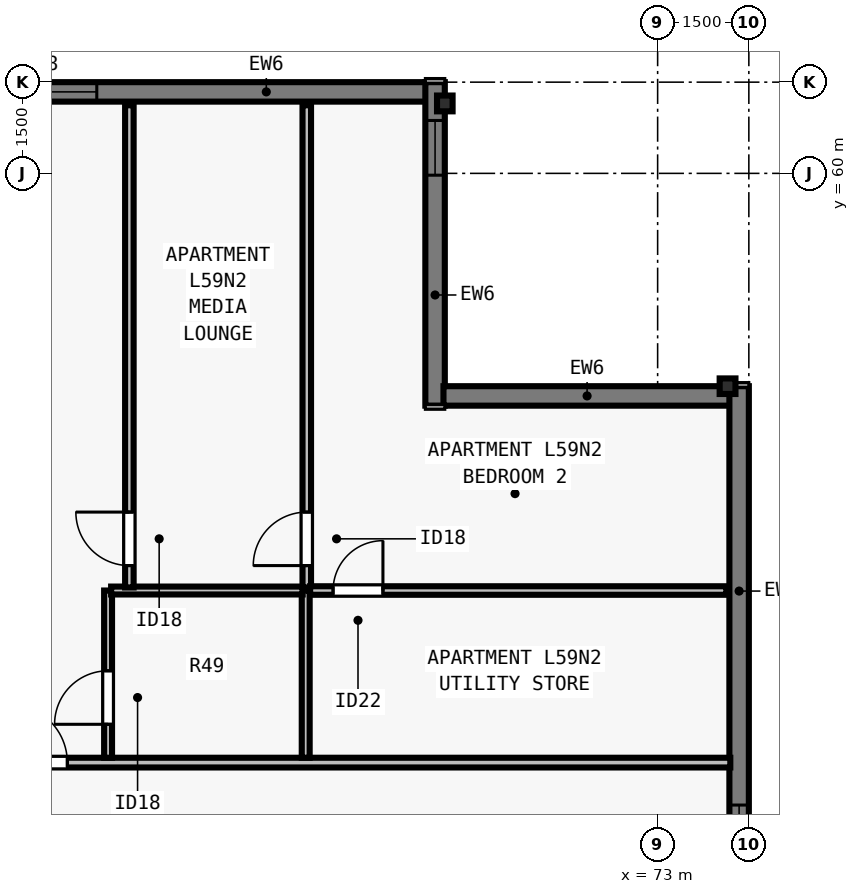
"""IFC4 building model, lengths in metres.
Left out: names, types, materials, properties, quantities, classifications, styles, units other than length and angle.
Written with IfcOpenShell. Run it as: python <this file> out.ifc"""

import sys

from ifc_helpers import new_model, si_unit, direction, frame, frame_2d, origin, origin_2d, place, context, subcontext, project, spatial, rectangle, i_section, extrude, element, fill, save


model = new_model("IFC4")
c1 = context("Model", 3, precision=1e-05, world=origin(), true_north=direction((0.0, 1.0)))
c2 = subcontext(c1, "Body", "Model", "MODEL_VIEW")
j1 = project(units=[si_unit("LENGTHUNIT", "METRE"), si_unit("PLANEANGLEUNIT", "RADIAN")], contexts=[c1])
p1 = place(None, origin())
s1 = spatial("IfcSite", under=j1, at=p1, CompositionType="ELEMENT")
p2 = place(p1, origin())
s2 = spatial("IfcBuilding", under=s1, at=p2, CompositionType="ELEMENT")
p3 = place(p2, frame((0.0, 0.0, 216.5)))
s3 = spatial("IfcBuildingStorey", under=s2, at=p3, CompositionType="ELEMENT", Elevation=216.5)
for number, where, z_axis, x_axis in (
    (1, (74.15, 56.5, 0.0), (0.0, 0.0, 1.0), (0.0, 1.0, 0.0)),
    (2, (69.5, 61.15, 0.0), (0.0, 0.0, 1.0), (1.0, 0.0, 0.0)),
):
    element("IfcColumn", number, at=place(p3, frame(where, z_axis=z_axis, x_axis=x_axis)), inside=s3, PredefinedType="COLUMN", context=c2, shape_type="SweptSolid", body=[
        extrude(i_section(OverallWidth=0.256, OverallDepth=0.26, WebThickness=0.01, FlangeThickness=0.017, FilletRadius=0.013, at=origin_2d()), origin(), (0.0, 0.0, 1.0), 3.5),
    ])
p4 = place(p3, frame((45.0, 61.34, 0.0), z_axis=(0.0, 0.0, 1.0), x_axis=(1.0, 0.0, 0.0)))
e3 = element("IfcWall", 3, at=p4, inside=s3, PredefinedType="SOLIDWALL", context=c2, shape_type="SweptSolid", body=[
    extrude(rectangle(XDim=24.202, YDim=0.32, at=frame_2d((12.101, 0.0))), origin(), (0.0, 0.0, 1.0), 3.29),
])
p5 = place(p4, frame((4.125, 0.0, 0.8)))
e4 = element("IfcOpeningElement", 4, at=p5, cuts=e3, PredefinedType="OPENING", context=c2, shape_type="SweptSolid", body=[
    extrude(rectangle(XDim=1.85, YDim=1.678, at=frame_2d((0.925, 0.839))), frame((0.0, 0.17, 0.0), z_axis=(0.0, -1.0, 0.0), x_axis=(1.0, 0.0, 0.0)), (0.0, 0.0, 1.0), 0.34),
])
p6 = place(p4, frame((8.026, 0.0, 0.8)))
e5 = element("IfcOpeningElement", 5, at=p6, cuts=e3, PredefinedType="OPENING", context=c2, shape_type="SweptSolid", body=[
    extrude(rectangle(XDim=1.55, YDim=1.678, at=frame_2d((0.775, 0.839))), frame((0.0, 0.17, 0.0), z_axis=(0.0, -1.0, 0.0), x_axis=(1.0, 0.0, 0.0)), (0.0, 0.0, 1.0), 0.34),
])
p7 = place(p4, frame((14.626, 0.0, 0.8)))
e6 = element("IfcOpeningElement", 6, at=p7, cuts=e3, PredefinedType="OPENING", context=c2, shape_type="SweptSolid", body=[
    extrude(rectangle(XDim=1.55, YDim=1.678, at=frame_2d((0.775, 0.839))), frame((0.0, 0.17, 0.0), z_axis=(0.0, -1.0, 0.0), x_axis=(1.0, 0.0, 0.0)), (0.0, 0.0, 1.0), 0.34),
])
p8 = place(p4, frame((16.927, 0.0, 0.8)))
e7 = element("IfcOpeningElement", 7, at=p8, cuts=e3, PredefinedType="OPENING", context=c2, shape_type="SweptSolid", body=[
    extrude(rectangle(XDim=1.85, YDim=1.678, at=frame_2d((0.925, 0.839))), frame((0.0, 0.17, 0.0), z_axis=(0.0, -1.0, 0.0), x_axis=(1.0, 0.0, 0.0)), (0.0, 0.0, 1.0), 0.34),
])
p9 = place(p3, frame((69.34, 61.5, 0.0), z_axis=(0.0, 0.0, 1.0), x_axis=(0.0, -1.0, 0.0)))
e8 = element("IfcWall", 8, at=p9, inside=s3, PredefinedType="SOLIDWALL", context=c2, shape_type="SweptSolid", body=[
    extrude(rectangle(XDim=5.32, YDim=0.32, at=frame_2d((2.66, 0.0))), origin(), (0.0, 0.0, 1.0), 3.29),
])
p10 = place(p9, frame((0.63, 0.0, 0.8)))
e9 = element("IfcOpeningElement", 9, at=p10, cuts=e8, PredefinedType="OPENING", context=c2, shape_type="SweptSolid", body=[
    extrude(rectangle(XDim=0.9, YDim=1.678, at=frame_2d((0.45, 0.839))), frame((0.0, 0.17, 0.0), z_axis=(0.0, -1.0, 0.0), x_axis=(1.0, 0.0, 0.0)), (0.0, 0.0, 1.0), 0.34),
])
p11 = place(p3, frame((69.478, 56.34, 0.0), z_axis=(0.0, 0.0, 1.0), x_axis=(1.0, 0.0, 0.0)))
e10 = element("IfcWall", 10, at=p11, inside=s3, PredefinedType="SOLIDWALL", context=c2, shape_type="SweptSolid", body=[
    extrude(rectangle(XDim=4.724, YDim=0.32, at=frame_2d((2.362, 0.0))), origin(), (0.0, 0.0, 1.0), 3.29),
])
p12 = place(p3, frame((74.34, 56.5, 0.0), z_axis=(0.0, 0.0, 1.0), x_axis=(0.0, -1.0, 0.0)))
e11 = element("IfcWall", 11, at=p12, inside=s3, PredefinedType="SOLIDWALL", context=c2, shape_type="SweptSolid", body=[
    extrude(rectangle(XDim=34.702, YDim=0.32, at=frame_2d((17.351, 0.0))), origin(), (0.0, 0.0, 1.0), 3.29),
])
p13 = place(p12, frame((6.888, 0.0, 0.8)))
e12 = element("IfcOpeningElement", 12, at=p13, cuts=e11, PredefinedType="OPENING", context=c2, shape_type="SweptSolid", body=[
    extrude(rectangle(XDim=1.55, YDim=1.678, at=frame_2d((0.775, 0.839))), frame((0.0, 0.17, 0.0), z_axis=(0.0, -1.0, 0.0), x_axis=(1.0, 0.0, 0.0)), (0.0, 0.0, 1.0), 0.34),
])
p14 = place(p12, frame((10.113, 0.0, 0.8)))
e13 = element("IfcOpeningElement", 13, at=p14, cuts=e11, PredefinedType="OPENING", context=c2, shape_type="SweptSolid", body=[
    extrude(rectangle(XDim=1.85, YDim=1.678, at=frame_2d((0.925, 0.839))), frame((0.0, 0.17, 0.0), z_axis=(0.0, -1.0, 0.0), x_axis=(1.0, 0.0, 0.0)), (0.0, 0.0, 1.0), 0.34),
])
p15 = place(p12, frame((14.038, 0.0, 0.8)))
e14 = element("IfcOpeningElement", 14, at=p15, cuts=e11, PredefinedType="OPENING", context=c2, shape_type="SweptSolid", body=[
    extrude(rectangle(XDim=1.55, YDim=1.678, at=frame_2d((0.775, 0.839))), frame((0.0, 0.17, 0.0), z_axis=(0.0, -1.0, 0.0), x_axis=(1.0, 0.0, 0.0)), (0.0, 0.0, 1.0), 0.34),
])
p16 = place(p12, frame((18.114, 0.0, 0.8)))
e15 = element("IfcOpeningElement", 15, at=p16, cuts=e11, PredefinedType="OPENING", context=c2, shape_type="SweptSolid", body=[
    extrude(rectangle(XDim=1.85, YDim=1.678, at=frame_2d((0.925, 0.839))), frame((0.0, 0.17, 0.0), z_axis=(0.0, -1.0, 0.0), x_axis=(1.0, 0.0, 0.0)), (0.0, 0.0, 1.0), 0.34),
])
p17 = place(p12, frame((23.614, 0.0, 0.8)))
e16 = element("IfcOpeningElement", 16, at=p17, cuts=e11, PredefinedType="OPENING", context=c2, shape_type="SweptSolid", body=[
    extrude(rectangle(XDim=1.85, YDim=1.678, at=frame_2d((0.925, 0.839))), frame((0.0, 0.17, 0.0), z_axis=(0.0, -1.0, 0.0), x_axis=(1.0, 0.0, 0.0)), (0.0, 0.0, 1.0), 0.34),
])
p18 = place(p12, frame((29.24, 0.0, 0.8)))
e17 = element("IfcOpeningElement", 17, at=p18, cuts=e11, PredefinedType="OPENING", context=c2, shape_type="SweptSolid", body=[
    extrude(rectangle(XDim=1.55, YDim=1.678, at=frame_2d((0.775, 0.839))), frame((0.0, 0.17, 0.0), z_axis=(0.0, -1.0, 0.0), x_axis=(1.0, 0.0, 0.0)), (0.0, 0.0, 1.0), 0.34),
])
p19 = place(p3, frame((29.805, 50.31, 0.0), z_axis=(0.0, 0.0, 1.0), x_axis=(1.0, 0.0, 0.0)))
e18 = element("IfcWall", 18, at=p19, inside=s3, PredefinedType="PARTITIONING", context=c2, shape_type="SweptSolid", body=[
    extrude(rectangle(XDim=44.39, YDim=0.16, at=frame_2d((22.195, 0.0))), origin(), (0.0, 0.0, 1.0), 2.958),
])
p20 = place(p19, frame((10.448, 0.0, 0.0)))
e19 = element("IfcOpeningElement", 19, at=p20, cuts=e18, PredefinedType="OPENING", context=c2, shape_type="SweptSolid", body=[
    extrude(rectangle(XDim=0.96, YDim=2.18, at=frame_2d((0.48, 1.09))), frame((0.0, 0.09, 0.0), z_axis=(0.0, -1.0, 0.0), x_axis=(1.0, 0.0, 0.0)), (0.0, 0.0, 1.0), 0.18),
])
p21 = place(p19, frame((32.528, 0.0, 0.0)))
e20 = element("IfcOpeningElement", 20, at=p21, cuts=e18, PredefinedType="OPENING", context=c2, shape_type="SweptSolid", body=[
    extrude(rectangle(XDim=0.96, YDim=2.18, at=frame_2d((0.48, 1.09))), frame((0.0, 0.09, 0.0), z_axis=(0.0, -1.0, 0.0), x_axis=(1.0, 0.0, 0.0)), (0.0, 0.0, 1.0), 0.18),
])
p22 = place(p3, frame((67.212, 50.39, 0.0), z_axis=(0.0, 0.0, 1.0), x_axis=(0.0, 1.0, 0.0)))
e21 = element("IfcWall", 21, at=p22, inside=s3, PredefinedType="PLUMBINGWALL", context=c2, shape_type="SweptSolid", body=[
    extrude(rectangle(XDim=2.75, YDim=0.13, at=frame_2d((1.375, 0.0))), origin(), (0.0, 0.0, 1.0), 3.29),
])
p23 = place(p3, frame((63.962, 50.39, 0.0), z_axis=(0.0, 0.0, 1.0), x_axis=(0.0, 1.0, 0.0)))
e22 = element("IfcWall", 22, at=p23, inside=s3, PredefinedType="PLUMBINGWALL", context=c2, shape_type="SweptSolid", body=[
    extrude(rectangle(XDim=2.75, YDim=0.13, at=frame_2d((1.375, 0.0))), origin(), (0.0, 0.0, 1.0), 2.573),
])
p24 = place(p23, frame((0.55, 0.0, 0.0)))
e23 = element("IfcOpeningElement", 23, at=p24, cuts=e22, PredefinedType="OPENING", context=c2, shape_type="SweptSolid", body=[
    extrude(rectangle(XDim=0.88, YDim=2.1, at=frame_2d((0.44, 1.05))), frame((0.0, 0.075, 0.0), z_axis=(0.0, -1.0, 0.0), x_axis=(1.0, 0.0, 0.0)), (0.0, 0.0, 1.0), 0.15),
])
p25 = place(p3, frame((64.012, 53.14, 0.0), z_axis=(0.0, 0.0, 1.0), x_axis=(1.0, 0.0, 0.0)))
e24 = element("IfcWall", 24, at=p25, inside=s3, PredefinedType="PLUMBINGWALL", context=c2, shape_type="SweptSolid", body=[
    extrude(rectangle(XDim=3.15, YDim=0.13, at=frame_2d((1.575, 0.0))), origin(), (0.0, 0.0, 1.0), 3.29),
])
p26 = place(p3, frame((67.23, 53.19, 0.0), z_axis=(0.0, 0.0, 1.0), x_axis=(0.0, 1.0, 0.0)))
e25 = element("IfcWall", 25, at=p26, inside=s3, PredefinedType="PARTITIONING", context=c2, shape_type="SweptSolid", body=[
    extrude(rectangle(XDim=7.93, YDim=0.14, at=frame_2d((3.965, 0.0))), origin(), (0.0, 0.0, 1.0), 2.573),
])
p27 = place(p26, frame((0.36, 0.0, 0.0)))
e26 = element("IfcOpeningElement", 26, at=p27, cuts=e25, PredefinedType="OPENING", context=c2, shape_type="SweptSolid", body=[
    extrude(rectangle(XDim=0.88, YDim=2.1, at=frame_2d((0.44, 1.05))), frame((0.0, 0.08, 0.0), z_axis=(0.0, -1.0, 0.0), x_axis=(1.0, 0.0, 0.0)), (0.0, 0.0, 1.0), 0.16),
])
p28 = place(p3, frame((67.285, 53.14, 0.0), z_axis=(0.0, 0.0, 1.0), x_axis=(1.0, 0.0, 0.0)))
e27 = element("IfcWall", 27, at=p28, inside=s3, PredefinedType="PARTITIONING", context=c2, shape_type="SweptSolid", body=[
    extrude(rectangle(XDim=6.845, YDim=0.14, at=frame_2d((3.422, 0.0))), origin(), (0.0, 0.0, 1.0), 2.958),
])
p29 = place(p28, frame((0.377, 0.0, 0.0)))
e28 = element("IfcOpeningElement", 28, at=p29, cuts=e27, PredefinedType="OPENING", context=c2, shape_type="SweptSolid", body=[
    extrude(rectangle(XDim=0.82, YDim=2.1, at=frame_2d((0.41, 1.05))), frame((0.0, 0.08, 0.0), z_axis=(0.0, -1.0, 0.0), x_axis=(1.0, 0.0, 0.0)), (0.0, 0.0, 1.0), 0.16),
])
p30 = place(p3, frame((64.312, 53.19, 0.0), z_axis=(0.0, 0.0, 1.0), x_axis=(0.0, 1.0, 0.0)))
e29 = element("IfcWall", 29, at=p30, inside=s3, PredefinedType="PARTITIONING", context=c2, shape_type="SweptSolid", body=[
    extrude(rectangle(XDim=7.93, YDim=0.14, at=frame_2d((3.965, 0.0))), origin(), (0.0, 0.0, 1.0), 2.573),
])
p31 = place(p30, frame((0.36, 0.0, 0.0)))
e30 = element("IfcOpeningElement", 30, at=p31, cuts=e29, PredefinedType="OPENING", context=c2, shape_type="SweptSolid", body=[
    extrude(rectangle(XDim=0.88, YDim=2.1, at=frame_2d((0.44, 1.05))), frame((0.0, 0.08, 0.0), z_axis=(0.0, -1.0, 0.0), x_axis=(1.0, 0.0, 0.0)), (0.0, 0.0, 1.0), 0.16),
])
p32 = place(p8, origin())
e31 = element("IfcWindow", 31, at=p32, inside=s3, PartitioningType="SINGLE_PANEL", PredefinedType="WINDOW", context=c2, shape_type="SweptSolid", body=[
    extrude(rectangle(XDim=1.85, YDim=1.678, at=frame_2d((0.925, 0.839))), frame((0.0, -0.05, 0.0), z_axis=(0.0, -1.0, 0.0), x_axis=(1.0, 0.0, 0.0)), (0.0, 0.0, 1.0), 0.06),
])
fill(e7, e31)
p33 = place(p13, origin())
e32 = element("IfcWindow", 32, at=p33, inside=s3, PartitioningType="SINGLE_PANEL", PredefinedType="WINDOW", context=c2, shape_type="SweptSolid", body=[
    extrude(rectangle(XDim=1.55, YDim=1.678, at=frame_2d((0.775, 0.839))), frame((0.0, -0.05, 0.0), z_axis=(0.0, -1.0, 0.0), x_axis=(1.0, 0.0, 0.0)), (0.0, 0.0, 1.0), 0.06),
])
fill(e12, e32)
p34 = place(p10, origin())
e33 = element("IfcWindow", 33, at=p34, inside=s3, PartitioningType="SINGLE_PANEL", PredefinedType="WINDOW", context=c2, shape_type="SweptSolid", body=[
    extrude(rectangle(XDim=0.9, YDim=1.678, at=frame_2d((0.45, 0.839))), frame((0.0, -0.04, 0.0), z_axis=(0.0, -1.0, 0.0), x_axis=(1.0, 0.0, 0.0)), (0.0, 0.0, 1.0), 0.06),
])
fill(e9, e33)
p35 = place(p24, origin())
e34 = element("IfcDoor", 34, at=p35, inside=s3, OperationType="SINGLE_SWING_LEFT", PredefinedType="DOOR", context=c2, shape_type="SweptSolid", body=[
    extrude(rectangle(XDim=0.88, YDim=2.1, at=frame_2d((0.44, 1.05))), frame((0.0, 0.025, 0.0), z_axis=(0.0, -1.0, 0.0), x_axis=(1.0, 0.0, 0.0)), (0.0, 0.0, 1.0), 0.05),
])
fill(e23, e34)
p36 = place(p29, origin())
e35 = element("IfcDoor", 35, at=p36, inside=s3, OperationType="SINGLE_SWING_RIGHT", PredefinedType="DOOR", context=c2, shape_type="SweptSolid", body=[
    extrude(rectangle(XDim=0.82, YDim=2.1, at=frame_2d((0.41, 1.05))), frame((0.0, 0.025, 0.0), z_axis=(0.0, -1.0, 0.0), x_axis=(1.0, 0.0, 0.0)), (0.0, 0.0, 1.0), 0.05),
])
fill(e28, e35)
p37 = place(p27, origin())
e36 = element("IfcDoor", 36, at=p37, inside=s3, OperationType="SINGLE_SWING_LEFT", PredefinedType="DOOR", context=c2, shape_type="SweptSolid", body=[
    extrude(rectangle(XDim=0.88, YDim=2.1, at=frame_2d((0.44, 1.05))), frame((0.0, 0.025, 0.0), z_axis=(0.0, -1.0, 0.0), x_axis=(1.0, 0.0, 0.0)), (0.0, 0.0, 1.0), 0.05),
])
fill(e26, e36)
p38 = place(p31, origin())
e37 = element("IfcDoor", 37, at=p38, inside=s3, OperationType="SINGLE_SWING_RIGHT", PredefinedType="DOOR", context=c2, shape_type="SweptSolid", body=[
    extrude(rectangle(XDim=0.88, YDim=2.1, at=frame_2d((0.44, 1.05))), frame((0.0, 0.025, 0.0), z_axis=(0.0, -1.0, 0.0), x_axis=(1.0, 0.0, 0.0)), (0.0, 0.0, 1.0), 0.05),
])
fill(e30, e37)
p39 = place(p21, origin())
e38 = element("IfcDoor", 38, at=p39, inside=s3, OperationType="SINGLE_SWING_LEFT", PredefinedType="DOOR", context=c2, shape_type="SweptSolid", body=[
    extrude(rectangle(XDim=0.96, YDim=2.18, at=frame_2d((0.48, 1.09))), frame((0.0, 0.025, 0.0), z_axis=(0.0, -1.0, 0.0), x_axis=(1.0, 0.0, 0.0)), (0.0, 0.0, 1.0), 0.05),
])
fill(e20, e38)
save(model, sys.argv[1])
